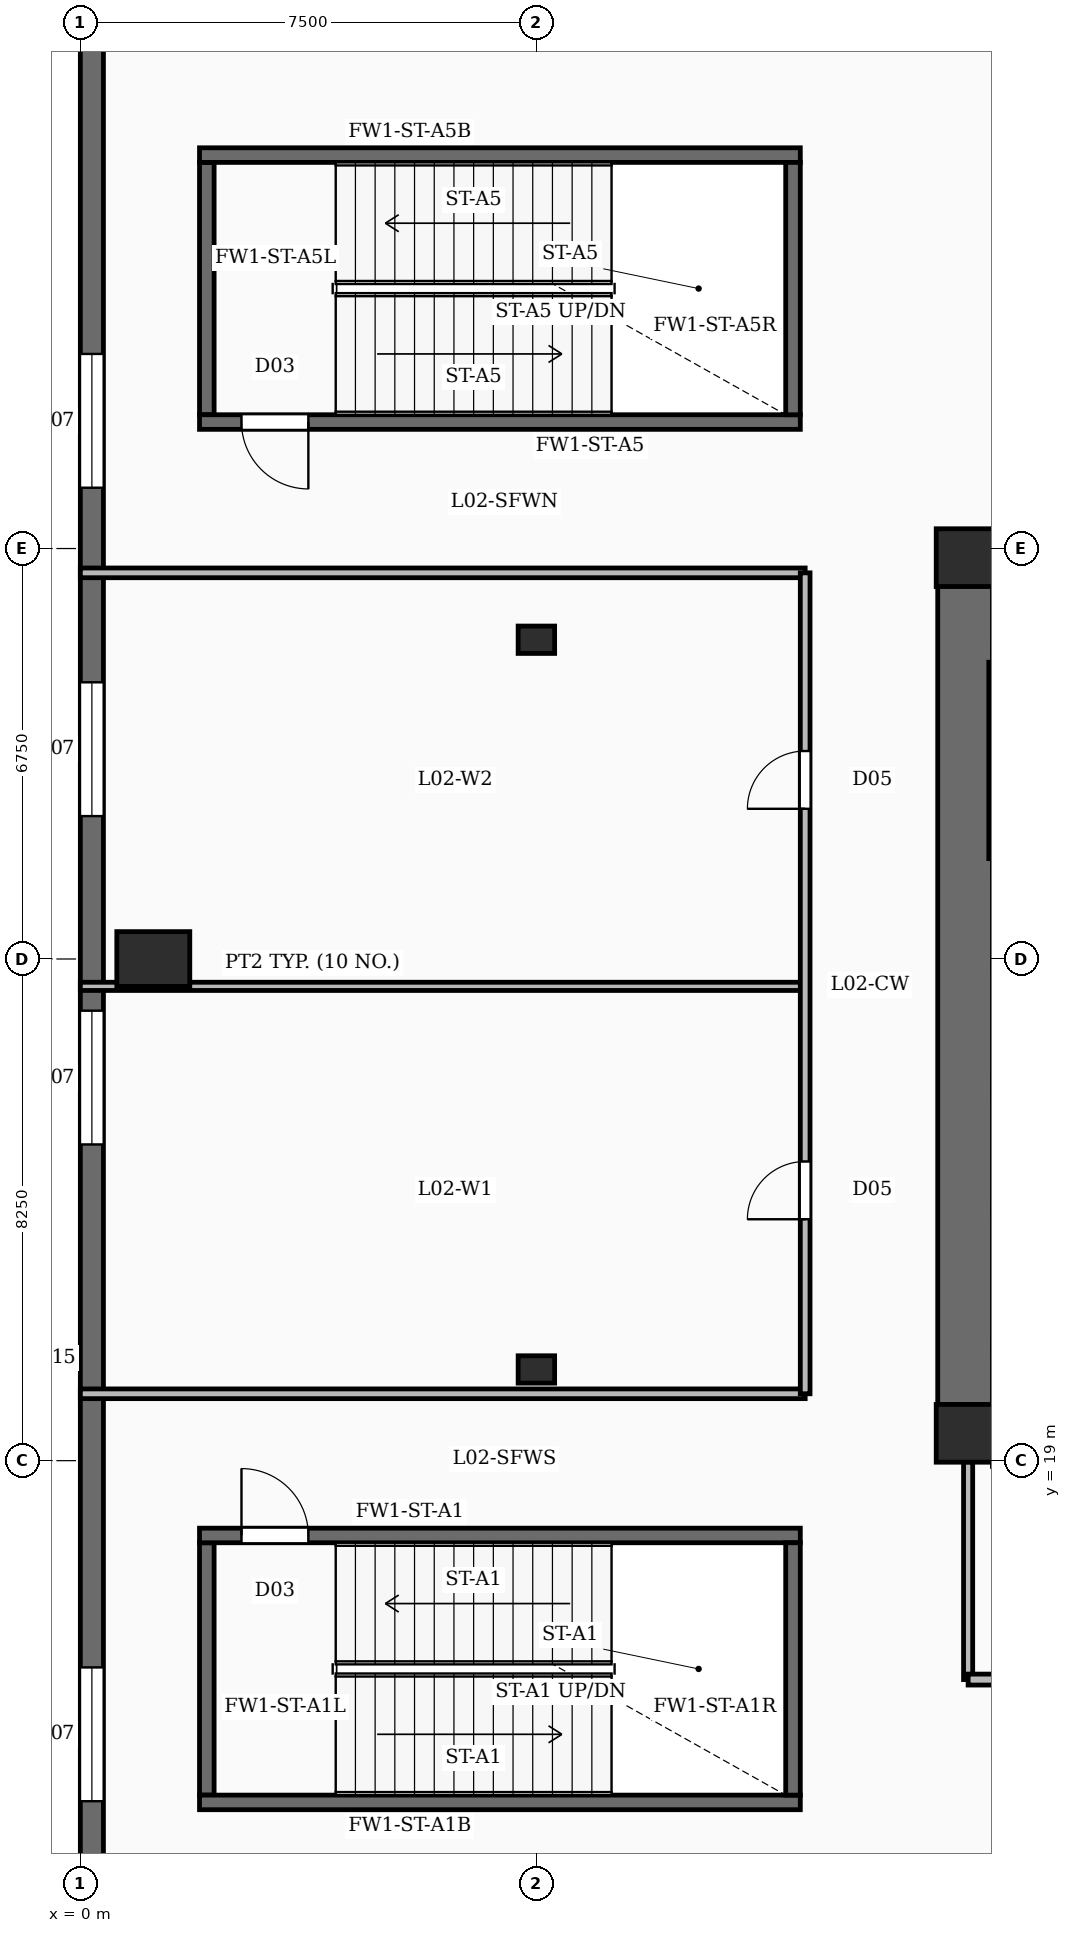
"""IFC4 building model, lengths in metres.
Left out: names, types, materials, properties, quantities, classifications, styles, units other than length and angle.
Written with IfcOpenShell. Run it as: python <this file> out.ifc"""

import sys

from ifc_helpers import new_model, si_unit, direction, frame, frame_2d, origin, origin_2d, place, context, subcontext, project, spatial, rectangle, extrude, element, fill, save


model = new_model("IFC4")
c1 = context("Model", 3, precision=1e-05, world=origin(), true_north=direction((0.0, 1.0)))
c2 = subcontext(c1, "Body", "Model", "MODEL_VIEW")
j1 = project(units=[si_unit("LENGTHUNIT", "METRE"), si_unit("PLANEANGLEUNIT", "RADIAN")], contexts=[c1])
p1 = place(None, origin())
s1 = spatial("IfcSite", under=j1, at=p1, CompositionType="ELEMENT")
p2 = place(p1, origin())
s2 = spatial("IfcBuilding", under=s1, at=p2, CompositionType="ELEMENT")
p3 = place(p2, frame((0.0, 0.0, 13.0)))
s3 = spatial("IfcBuildingStorey", under=s2, at=p3, CompositionType="ELEMENT", Elevation=13.0)
p4 = place(p3, frame((14.55, 19.0, -0.35), z_axis=(0.0, 0.0, 1.0), x_axis=(0.0, 1.0, 0.0)))
e1 = element("IfcWall", 1, at=p4, inside=s3, PredefinedType="SHEAR", context=c2, shape_type="SweptSolid", body=[
    extrude(rectangle(XDim=15.3, YDim=0.9, at=frame_2d((7.65, 0.0))), origin(), (0.0, 0.0, 1.0), 5.0),
])
for number, where, z_axis, x_axis in (
    (2, (14.55, 19.45, -0.35), (0.0, 0.0, 1.0), (1.0, 0.0, 0.0)),
    (3, (14.55, 33.85, -0.35), (0.0, 0.0, 1.0), (1.0, 0.0, 0.0)),
):
    element("IfcColumn", number, at=place(p3, frame(where, z_axis=z_axis, x_axis=x_axis)), inside=s3, PredefinedType="COLUMN", context=c2, shape_type="SweptSolid", body=[
        extrude(rectangle(XDim=0.95, YDim=0.95, at=origin_2d()), origin(), (0.0, 0.0, 1.0), 5.0),
    ])
p5 = place(p3, frame((1.2, 27.25, -0.35), z_axis=(0.0, 0.0, 1.0), x_axis=(1.0, 0.0, 0.0)))
e4 = element("IfcColumn", 4, at=p5, inside=s3, PredefinedType="COLUMN", context=c2, shape_type="SweptSolid", body=[
    extrude(rectangle(XDim=1.2, YDim=0.9, at=origin_2d()), origin(), (0.0, 0.0, 1.0), 5.0),
])
for number, where, z_axis, x_axis in (
    (5, (7.5, 20.5, -0.35), (0.0, 0.0, 1.0), (1.0, 0.0, 0.0)),
    (6, (7.5, 32.5, -0.35), (0.0, 0.0, 1.0), (1.0, 0.0, 0.0)),
):
    element("IfcColumn", number, at=place(p3, frame(where, z_axis=z_axis, x_axis=x_axis)), inside=s3, PredefinedType="PILASTER", context=c2, shape_type="SweptSolid", body=[
        extrude(rectangle(XDim=0.6, YDim=0.45, at=origin_2d()), origin(), (0.0, 0.0, 1.0), 5.0),
    ])
p6 = place(p3, frame((0.19, 5.4, 0.0), z_axis=(0.0, 0.0, 1.0), x_axis=(0.0, 1.0, 0.0)))
e7 = element("IfcWall", 7, at=p6, inside=s3, PredefinedType="SOLIDWALL", context=c2, shape_type="SweptSolid", body=[
    extrude(rectangle(XDim=43.7, YDim=0.38, at=frame_2d((21.85, 0.0))), origin(), (0.0, 0.0, 1.0), 4.65),
])
p7 = place(p6, frame((2.6, 0.0, 0.95)))
e8 = element("IfcOpeningElement", 8, at=p7, cuts=e7, PredefinedType="OPENING", context=c2, shape_type="SweptSolid", body=[
    extrude(rectangle(XDim=2.2, YDim=2.5, at=frame_2d((1.1, 1.25))), frame((0.0, 0.2, 0.0), z_axis=(0.0, -1.0, 0.0), x_axis=(1.0, 0.0, 0.0)), (0.0, 0.0, 1.0), 0.4),
])
p8 = place(p6, frame((8.0, 0.0, 0.95)))
e9 = element("IfcOpeningElement", 9, at=p8, cuts=e7, PredefinedType="OPENING", context=c2, shape_type="SweptSolid", body=[
    extrude(rectangle(XDim=2.2, YDim=2.5, at=frame_2d((1.1, 1.25))), frame((0.0, 0.2, 0.0), z_axis=(0.0, -1.0, 0.0), x_axis=(1.0, 0.0, 0.0)), (0.0, 0.0, 1.0), 0.4),
])
p9 = place(p6, frame((18.8, 0.0, 0.95)))
e10 = element("IfcOpeningElement", 10, at=p9, cuts=e7, PredefinedType="OPENING", context=c2, shape_type="SweptSolid", body=[
    extrude(rectangle(XDim=2.2, YDim=2.5, at=frame_2d((1.1, 1.25))), frame((0.0, 0.2, 0.0), z_axis=(0.0, -1.0, 0.0), x_axis=(1.0, 0.0, 0.0)), (0.0, 0.0, 1.0), 0.4),
])
p10 = place(p6, frame((24.2, 0.0, 0.95)))
e11 = element("IfcOpeningElement", 11, at=p10, cuts=e7, PredefinedType="OPENING", context=c2, shape_type="SweptSolid", body=[
    extrude(rectangle(XDim=2.2, YDim=2.5, at=frame_2d((1.1, 1.25))), frame((0.0, 0.2, 0.0), z_axis=(0.0, -1.0, 0.0), x_axis=(1.0, 0.0, 0.0)), (0.0, 0.0, 1.0), 0.4),
])
p11 = place(p6, frame((29.6, 0.0, 0.95)))
e12 = element("IfcOpeningElement", 12, at=p11, cuts=e7, PredefinedType="OPENING", context=c2, shape_type="SweptSolid", body=[
    extrude(rectangle(XDim=2.2, YDim=2.5, at=frame_2d((1.1, 1.25))), frame((0.0, 0.2, 0.0), z_axis=(0.0, -1.0, 0.0), x_axis=(1.0, 0.0, 0.0)), (0.0, 0.0, 1.0), 0.4),
])
p12 = place(p3, frame((1.96, 17.77, 0.0), z_axis=(0.0, 0.0, 1.0), x_axis=(1.0, 0.0, 0.0)))
e13 = element("IfcWall", 13, at=p12, inside=s3, PredefinedType="SOLIDWALL", context=c2, shape_type="SweptSolid", body=[
    extrude(rectangle(XDim=9.88, YDim=0.24, at=frame_2d((4.94, 0.0))), origin(), (0.0, 0.0, 1.0), 4.65),
])
p13 = place(p12, frame((0.69, 0.0, 0.0)))
e14 = element("IfcOpeningElement", 14, at=p13, cuts=e13, PredefinedType="OPENING", context=c2, shape_type="SweptSolid", body=[
    extrude(rectangle(XDim=1.1, YDim=2.15, at=frame_2d((0.55, 1.075))), frame((0.0, 0.13, 0.0), z_axis=(0.0, -1.0, 0.0), x_axis=(1.0, 0.0, 0.0)), (0.0, 0.0, 1.0), 0.26),
])
p14 = place(p3, frame((1.96, 13.38, 0.0), z_axis=(0.0, 0.0, 1.0), x_axis=(1.0, 0.0, 0.0)))
e15 = element("IfcWall", 15, at=p14, inside=s3, PredefinedType="SOLIDWALL", context=c2, shape_type="SweptSolid", body=[
    extrude(rectangle(XDim=9.88, YDim=0.24, at=frame_2d((4.94, 0.0))), origin(), (0.0, 0.0, 1.0), 4.65),
])
for number, where, z_axis, x_axis in (
    (16, (2.08, 13.5, 0.0), (0.0, 0.0, 1.0), (0.0, 1.0, 0.0)),
    (17, (11.72, 13.5, 0.0), (0.0, 0.0, 1.0), (0.0, 1.0, 0.0)),
):
    element("IfcWall", number, at=place(p3, frame(where, z_axis=z_axis, x_axis=x_axis)), inside=s3, PredefinedType="SOLIDWALL", context=c2, shape_type="SweptSolid", body=[
        extrude(rectangle(XDim=4.15, YDim=0.24, at=frame_2d((2.075, 0.0))), origin(), (0.0, 0.0, 1.0), 4.65),
    ])
p15 = place(p3, frame((11.84, 36.08, 0.0), z_axis=(0.0, 0.0, 1.0), x_axis=(-1.0, 0.0, 0.0)))
e18 = element("IfcWall", 18, at=p15, inside=s3, PredefinedType="SOLIDWALL", context=c2, shape_type="SweptSolid", body=[
    extrude(rectangle(XDim=9.88, YDim=0.24, at=frame_2d((4.94, 0.0))), origin(), (0.0, 0.0, 1.0), 4.65),
])
p16 = place(p15, frame((8.09, 0.0, 0.0)))
e19 = element("IfcOpeningElement", 19, at=p16, cuts=e18, PredefinedType="OPENING", context=c2, shape_type="SweptSolid", body=[
    extrude(rectangle(XDim=1.1, YDim=2.15, at=frame_2d((0.55, 1.075))), frame((0.0, 0.13, 0.0), z_axis=(0.0, -1.0, 0.0), x_axis=(1.0, 0.0, 0.0)), (0.0, 0.0, 1.0), 0.26),
])
p17 = place(p3, frame((1.96, 40.47, 0.0), z_axis=(0.0, 0.0, 1.0), x_axis=(1.0, 0.0, 0.0)))
e20 = element("IfcWall", 20, at=p17, inside=s3, PredefinedType="SOLIDWALL", context=c2, shape_type="SweptSolid", body=[
    extrude(rectangle(XDim=9.88, YDim=0.24, at=frame_2d((4.94, 0.0))), origin(), (0.0, 0.0, 1.0), 4.65),
])
for number, where, z_axis, x_axis in (
    (21, (2.08, 36.2, 0.0), (0.0, 0.0, 1.0), (0.0, 1.0, 0.0)),
    (22, (11.72, 36.2, 0.0), (0.0, 0.0, 1.0), (0.0, 1.0, 0.0)),
):
    element("IfcWall", number, at=place(p3, frame(where, z_axis=z_axis, x_axis=x_axis)), inside=s3, PredefinedType="SOLIDWALL", context=c2, shape_type="SweptSolid", body=[
        extrude(rectangle(XDim=4.15, YDim=0.24, at=frame_2d((2.075, 0.0))), origin(), (0.0, 0.0, 1.0), 4.65),
    ])
p18 = place(p3, frame((15.06, 28.9, 0.0), z_axis=(0.0, 0.0, 1.0), x_axis=(0.0, 1.0, 0.0)))
e23 = element("IfcWall", 23, at=p18, inside=s3, PredefinedType="SOLIDWALL", context=c2, shape_type="SweptSolid", body=[
    extrude(rectangle(XDim=3.23, YDim=0.24, at=frame_2d((1.615, 0.0))), origin(), (0.0, 0.0, 1.0), 4.65),
])
p19 = place(p3, frame((14.6, 15.4, 0.0), z_axis=(0.0, 0.0, 1.0), x_axis=(1.0, 0.0, 0.0)))
e24 = element("IfcWall", 24, at=p19, inside=s3, PredefinedType="PARTITIONING", context=c2, shape_type="SweptSolid", body=[
    extrude(rectangle(XDim=9.9, YDim=0.18, at=frame_2d((4.95, 0.0))), origin(), (0.0, 0.0, 1.0), 3.71),
])
p20 = place(p19, frame((0.74, 0.0, 0.0)))
e25 = element("IfcOpeningElement", 25, at=p20, cuts=e24, PredefinedType="OPENING", context=c2, shape_type="SweptSolid", body=[
    extrude(rectangle(XDim=0.92, YDim=2.1, at=frame_2d((0.46, 1.05))), frame((0.0, 0.1, 0.0), z_axis=(0.0, -1.0, 0.0), x_axis=(1.0, 0.0, 0.0)), (0.0, 0.0, 1.0), 0.2),
])
p21 = place(p19, frame((3.19, 0.0, 0.0)))
e26 = element("IfcOpeningElement", 26, at=p21, cuts=e24, PredefinedType="OPENING", context=c2, shape_type="SweptSolid", body=[
    extrude(rectangle(XDim=0.92, YDim=2.1, at=frame_2d((0.46, 1.05))), frame((0.0, 0.1, 0.0), z_axis=(0.0, -1.0, 0.0), x_axis=(1.0, 0.0, 0.0)), (0.0, 0.0, 1.0), 0.2),
])
p22 = place(p19, frame((5.69, 0.0, 0.0)))
e27 = element("IfcOpeningElement", 27, at=p22, cuts=e24, PredefinedType="OPENING", context=c2, shape_type="SweptSolid", body=[
    extrude(rectangle(XDim=0.92, YDim=2.1, at=frame_2d((0.46, 1.05))), frame((0.0, 0.1, 0.0), z_axis=(0.0, -1.0, 0.0), x_axis=(1.0, 0.0, 0.0)), (0.0, 0.0, 1.0), 0.2),
])
p23 = place(p19, frame((8.19, 0.0, 0.0)))
e28 = element("IfcOpeningElement", 28, at=p23, cuts=e24, PredefinedType="OPENING", context=c2, shape_type="SweptSolid", body=[
    extrude(rectangle(XDim=0.92, YDim=2.1, at=frame_2d((0.46, 1.05))), frame((0.0, 0.1, 0.0), z_axis=(0.0, -1.0, 0.0), x_axis=(1.0, 0.0, 0.0)), (0.0, 0.0, 1.0), 0.2),
])
p24 = place(p3, frame((14.6, 15.4, 0.0), z_axis=(0.0, 0.0, 1.0), x_axis=(0.0, 1.0, 0.0)))
e29 = element("IfcWall", 29, at=p24, inside=s3, PredefinedType="PARTITIONING", context=c2, shape_type="SweptSolid", body=[
    extrude(rectangle(XDim=3.58, YDim=0.15, at=frame_2d((1.79, 0.0))), origin(), (0.0, 0.0, 1.0), 3.71),
])
p25 = place(p3, frame((0.0, 26.8, 0.0), z_axis=(0.0, 0.0, 1.0), x_axis=(1.0, 0.0, 0.0)))
e30 = element("IfcWall", 30, at=p25, inside=s3, PredefinedType="PARTITIONING", context=c2, shape_type="SweptSolid", body=[
    extrude(rectangle(XDim=11.92, YDim=0.135, at=frame_2d((5.96, 0.0))), origin(), (0.0, 0.0, 1.0), 3.71),
])
p26 = place(p3, frame((11.92, 20.1, 0.0), z_axis=(0.0, 0.0, 1.0), x_axis=(0.0, 1.0, 0.0)))
e31 = element("IfcWall", 31, at=p26, inside=s3, PredefinedType="PARTITIONING", context=c2, shape_type="SweptSolid", body=[
    extrude(rectangle(XDim=13.5, YDim=0.16, at=frame_2d((6.75, 0.0))), origin(), (0.0, 0.0, 1.0), 3.71),
])
p27 = place(p26, frame((2.87, 0.0, 0.0)))
e32 = element("IfcOpeningElement", 32, at=p27, cuts=e31, PredefinedType="OPENING", context=c2, shape_type="SweptSolid", body=[
    extrude(rectangle(XDim=0.95, YDim=2.15, at=frame_2d((0.475, 1.075))), frame((0.0, 0.09, 0.0), z_axis=(0.0, -1.0, 0.0), x_axis=(1.0, 0.0, 0.0)), (0.0, 0.0, 1.0), 0.18),
])
p28 = place(p26, frame((9.62, 0.0, 0.0)))
e33 = element("IfcOpeningElement", 33, at=p28, cuts=e31, PredefinedType="OPENING", context=c2, shape_type="SweptSolid", body=[
    extrude(rectangle(XDim=0.95, YDim=2.15, at=frame_2d((0.475, 1.075))), frame((0.0, 0.09, 0.0), z_axis=(0.0, -1.0, 0.0), x_axis=(1.0, 0.0, 0.0)), (0.0, 0.0, 1.0), 0.18),
])
for number, where, z_axis, x_axis in (
    (34, (0.0, 20.1, 0.0), (0.0, 0.0, 1.0), (1.0, 0.0, 0.0)),
    (35, (0.0, 33.6, 0.0), (0.0, 0.0, 1.0), (1.0, 0.0, 0.0)),
):
    element("IfcWall", number, at=place(p3, frame(where, z_axis=z_axis, x_axis=x_axis)), inside=s3, PredefinedType="PARTITIONING", context=c2, shape_type="SweptSolid", body=[
        extrude(rectangle(XDim=11.92, YDim=0.16, at=frame_2d((5.96, 0.0))), origin(), (0.0, 0.0, 1.0), 3.71),
    ])
p29 = place(p8, origin())
e36 = element("IfcWindow", 36, at=p29, inside=s3, PartitioningType="DOUBLE_PANEL_VERTICAL", PredefinedType="WINDOW", context=c2, shape_type="SweptSolid", body=[
    extrude(rectangle(XDim=2.2, YDim=2.5, at=frame_2d((1.1, 1.25))), frame((0.0, 0.03, 0.0), z_axis=(0.0, -1.0, 0.0), x_axis=(1.0, 0.0, 0.0)), (0.0, 0.0, 1.0), 0.06),
])
fill(e9, e36)
p30 = place(p9, origin())
e37 = element("IfcWindow", 37, at=p30, inside=s3, PartitioningType="DOUBLE_PANEL_VERTICAL", PredefinedType="WINDOW", context=c2, shape_type="SweptSolid", body=[
    extrude(rectangle(XDim=2.2, YDim=2.5, at=frame_2d((1.1, 1.25))), frame((0.0, 0.03, 0.0), z_axis=(0.0, -1.0, 0.0), x_axis=(1.0, 0.0, 0.0)), (0.0, 0.0, 1.0), 0.06),
])
fill(e10, e37)
p31 = place(p10, origin())
e38 = element("IfcWindow", 38, at=p31, inside=s3, PartitioningType="DOUBLE_PANEL_VERTICAL", PredefinedType="WINDOW", context=c2, shape_type="SweptSolid", body=[
    extrude(rectangle(XDim=2.2, YDim=2.5, at=frame_2d((1.1, 1.25))), frame((0.0, 0.03, 0.0), z_axis=(0.0, -1.0, 0.0), x_axis=(1.0, 0.0, 0.0)), (0.0, 0.0, 1.0), 0.06),
])
fill(e11, e38)
p32 = place(p11, origin())
e39 = element("IfcWindow", 39, at=p32, inside=s3, PartitioningType="DOUBLE_PANEL_VERTICAL", PredefinedType="WINDOW", context=c2, shape_type="SweptSolid", body=[
    extrude(rectangle(XDim=2.2, YDim=2.5, at=frame_2d((1.1, 1.25))), frame((0.0, 0.03, 0.0), z_axis=(0.0, -1.0, 0.0), x_axis=(1.0, 0.0, 0.0)), (0.0, 0.0, 1.0), 0.06),
])
fill(e12, e39)
p33 = place(p13, origin())
e40 = element("IfcDoor", 40, at=p33, inside=s3, OperationType="SINGLE_SWING_LEFT", PredefinedType="DOOR", context=c2, shape_type="SweptSolid", body=[
    extrude(rectangle(XDim=1.1, YDim=2.15, at=frame_2d((0.55, 1.075))), frame((0.0, 0.025, 0.0), z_axis=(0.0, -1.0, 0.0), x_axis=(1.0, 0.0, 0.0)), (0.0, 0.0, 1.0), 0.05),
])
fill(e14, e40)
p34 = place(p16, origin())
e41 = element("IfcDoor", 41, at=p34, inside=s3, OperationType="SINGLE_SWING_LEFT", PredefinedType="DOOR", context=c2, shape_type="SweptSolid", body=[
    extrude(rectangle(XDim=1.1, YDim=2.15, at=frame_2d((0.55, 1.075))), frame((0.0, 0.025, 0.0), z_axis=(0.0, -1.0, 0.0), x_axis=(1.0, 0.0, 0.0)), (0.0, 0.0, 1.0), 0.05),
])
fill(e19, e41)
p35 = place(p27, origin())
e42 = element("IfcDoor", 42, at=p35, inside=s3, OperationType="SINGLE_SWING_LEFT", PredefinedType="DOOR", context=c2, shape_type="SweptSolid", body=[
    extrude(rectangle(XDim=0.95, YDim=2.15, at=frame_2d((0.475, 1.075))), frame((0.0, 0.025, 0.0), z_axis=(0.0, -1.0, 0.0), x_axis=(1.0, 0.0, 0.0)), (0.0, 0.0, 1.0), 0.05),
])
fill(e32, e42)
p36 = place(p28, origin())
e43 = element("IfcDoor", 43, at=p36, inside=s3, OperationType="SINGLE_SWING_LEFT", PredefinedType="DOOR", context=c2, shape_type="SweptSolid", body=[
    extrude(rectangle(XDim=0.95, YDim=2.15, at=frame_2d((0.475, 1.075))), frame((0.0, 0.025, 0.0), z_axis=(0.0, -1.0, 0.0), x_axis=(1.0, 0.0, 0.0)), (0.0, 0.0, 1.0), 0.05),
])
fill(e33, e43)
save(model, sys.argv[1])
